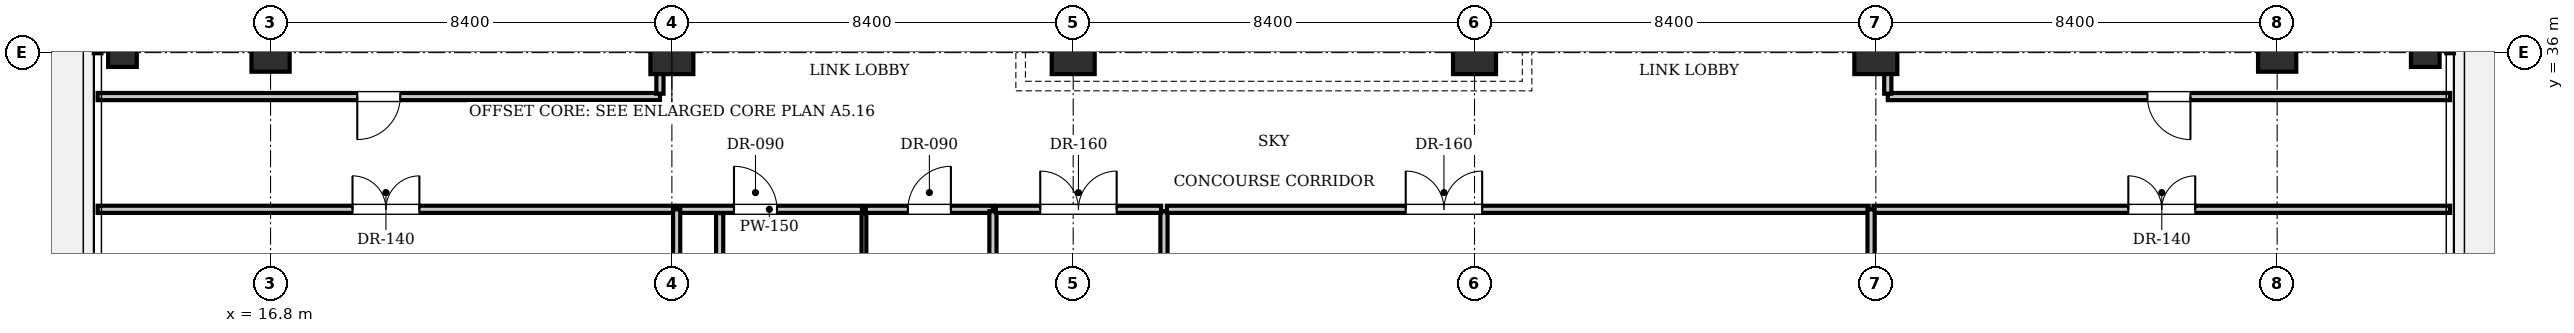
"""IFC4 building model, lengths in metres.
Left out: names, types, materials, properties, quantities, classifications, styles, units other than length and angle.
Written with IfcOpenShell. Run it as: python <this file> out.ifc"""

import sys

from ifc_helpers import new_model, si_unit, direction, frame, frame_2d, origin, origin_2d, place, context, subcontext, project, spatial, rectangle, i_section, extrude, element, fill, save


model = new_model("IFC4")
c1 = context("Model", 3, precision=1e-05, world=origin(), true_north=direction((0.0, 1.0)))
c2 = subcontext(c1, "Body", "Model", "MODEL_VIEW")
j1 = project(units=[si_unit("LENGTHUNIT", "METRE"), si_unit("PLANEANGLEUNIT", "RADIAN")], contexts=[c1])
p1 = place(None, origin())
s1 = spatial("IfcSite", under=j1, at=p1, CompositionType="ELEMENT")
p2 = place(p1, origin())
s2 = spatial("IfcBuilding", under=s1, at=p2, CompositionType="ELEMENT")
p3 = place(p2, frame((0.0, 0.0, 122.5)))
s3 = spatial("IfcBuildingStorey", under=s2, at=p3, CompositionType="ELEMENT", Elevation=122.5)
for number, where, z_axis, x_axis in (
    (1, (25.2, 36.0, 0.0), (0.0, 0.0, 1.0), (1.0, 0.0, 0.0)),
    (2, (33.6, 36.0, 0.0), (0.0, 0.0, 1.0), (1.0, 0.0, 0.0)),
    (3, (42.0, 36.0, 0.0), (0.0, 0.0, 1.0), (1.0, 0.0, 0.0)),
    (4, (50.4, 36.0, 0.0), (0.0, 0.0, 1.0), (1.0, 0.0, 0.0)),
):
    element("IfcColumn", number, at=place(p3, frame(where, z_axis=z_axis, x_axis=x_axis)), inside=s3, PredefinedType="COLUMN", context=c2, shape_type="SweptSolid", body=[
        extrude(rectangle(XDim=0.9, YDim=0.9, at=origin_2d()), origin(), (0.0, 0.0, 1.0), 4.9),
    ])
for number, where, z_axis, x_axis in (
    (5, (16.8, 36.0, 0.0), (0.0, 0.0, 1.0), (1.0, 0.0, 0.0)),
    (6, (58.8, 36.0, 0.0), (0.0, 0.0, 1.0), (1.0, 0.0, 0.0)),
):
    element("IfcColumn", number, at=place(p3, frame(where, z_axis=z_axis, x_axis=x_axis)), inside=s3, PredefinedType="COLUMN", context=c2, shape_type="SweptSolid", body=[
        extrude(rectangle(XDim=0.8, YDim=0.8, at=origin_2d()), origin(), (0.0, 0.0, 1.0), 4.9),
    ])
for number, where, z_axis, x_axis in (
    (7, (13.7, 36.0, -0.24), (0.0, 0.0, 1.0), (1.0, 0.0, 0.0)),
    (8, (61.9, 36.0, -0.24), (0.0, 0.0, 1.0), (1.0, 0.0, 0.0)),
):
    element("IfcColumn", number, at=place(p3, frame(where, z_axis=z_axis, x_axis=x_axis)), inside=s3, PredefinedType="COLUMN", context=c2, shape_type="SweptSolid", body=[
        extrude(i_section(OverallWidth=0.6, OverallDepth=0.6, WebThickness=0.025, FlangeThickness=0.038, at=origin_2d()), origin(), (0.0, 0.0, 1.0), 5.14),
    ])
p4 = place(p3, frame((25.3, 32.72, 0.0), z_axis=(0.0, 0.0, 1.0), x_axis=(1.0, 0.0, 0.0)))
e9 = element("IfcWall", 9, at=p4, inside=s3, PredefinedType="PARTITIONING", context=c2, shape_type="SweptSolid", body=[
    extrude(rectangle(XDim=3.88, YDim=0.15, at=frame_2d((1.94, 0.0))), origin(), (0.0, 0.0, 1.0), 4.66),
])
p5 = place(p4, frame((1.2, 0.0, 0.0)))
e10 = element("IfcOpeningElement", 10, at=p5, cuts=e9, PredefinedType="OPENING", context=c2, shape_type="SweptSolid", body=[
    extrude(rectangle(XDim=0.9, YDim=2.1, at=frame_2d((0.45, 1.05))), frame((0.0, 0.085, 0.0), z_axis=(0.0, -1.0, 0.0), x_axis=(1.0, 0.0, 0.0)), (0.0, 0.0, 1.0), 0.17),
])
p6 = place(p3, frame((29.26, 32.72, 0.0), z_axis=(0.0, 0.0, 1.0), x_axis=(1.0, 0.0, 0.0)))
e11 = element("IfcWall", 11, at=p6, inside=s3, PredefinedType="PARTITIONING", context=c2, shape_type="SweptSolid", body=[
    extrude(rectangle(XDim=2.66, YDim=0.15, at=frame_2d((1.33, 0.0))), origin(), (0.0, 0.0, 1.0), 4.66),
])
p7 = place(p6, frame((0.88, 0.0, 0.0)))
e12 = element("IfcOpeningElement", 12, at=p7, cuts=e11, PredefinedType="OPENING", context=c2, shape_type="SweptSolid", body=[
    extrude(rectangle(XDim=0.9, YDim=2.1, at=frame_2d((0.45, 1.05))), frame((0.0, 0.085, 0.0), z_axis=(0.0, -1.0, 0.0), x_axis=(1.0, 0.0, 0.0)), (0.0, 0.0, 1.0), 0.17),
])
p8 = place(p3, frame((26.2, 29.46, 0.0), z_axis=(0.0, 0.0, 1.0), x_axis=(0.0, 1.0, 0.0)))
e13 = element("IfcWall", 13, at=p8, inside=s3, PredefinedType="PARTITIONING", context=c2, shape_type="SweptSolid", body=[
    extrude(rectangle(XDim=3.18, YDim=0.15, at=frame_2d((1.59, 0.0))), origin(), (0.0, 0.0, 1.0), 4.66),
])
p9 = place(p3, frame((29.22, 29.46, 0.0), z_axis=(0.0, 0.0, 1.0), x_axis=(0.0, 1.0, 0.0)))
e14 = element("IfcWall", 14, at=p9, inside=s3, PredefinedType="PARTITIONING", context=c2, shape_type="SweptSolid", body=[
    extrude(rectangle(XDim=3.18, YDim=0.1, at=frame_2d((1.59, 0.0))), origin(), (0.0, 0.0, 1.0), 4.66),
])
p10 = place(p3, frame((31.92, 29.46, 0.0), z_axis=(0.0, 0.0, 1.0), x_axis=(0.0, 1.0, 0.0)))
e15 = element("IfcWall", 15, at=p10, inside=s3, PredefinedType="PARTITIONING", context=c2, shape_type="SweptSolid", body=[
    extrude(rectangle(XDim=3.22, YDim=0.15, at=frame_2d((1.61, 0.0))), origin(), (0.0, 0.0, 1.0), 4.66),
])
p11 = place(p3, frame((35.5, 21.08, 0.0), z_axis=(0.0, 0.0, 1.0), x_axis=(0.0, 1.0, 0.0)))
e16 = element("IfcWall", 16, at=p11, inside=s3, PredefinedType="PARTITIONING", context=c2, shape_type="SweptSolid", body=[
    extrude(rectangle(XDim=11.6, YDim=0.15, at=frame_2d((5.8, 0.0))), origin(), (0.0, 0.0, 1.0), 4.66),
])
p12 = place(p3, frame((31.98, 32.72, 0.0), z_axis=(0.0, 0.0, 1.0), x_axis=(1.0, 0.0, 0.0)))
e17 = element("IfcWall", 17, at=p12, inside=s3, PredefinedType="PARTITIONING", context=c2, shape_type="SweptSolid", body=[
    extrude(rectangle(XDim=3.46, YDim=0.15, at=frame_2d((1.73, 0.0))), origin(), (0.0, 0.0, 1.0), 4.66),
])
p13 = place(p12, frame((0.93, 0.0, 0.0)))
e18 = element("IfcOpeningElement", 18, at=p13, cuts=e17, PredefinedType="OPENING", context=c2, shape_type="SweptSolid", body=[
    extrude(rectangle(XDim=1.6, YDim=2.3, at=frame_2d((0.8, 1.15))), frame((0.0, 0.085, 0.0), z_axis=(0.0, -1.0, 0.0), x_axis=(1.0, 0.0, 0.0)), (0.0, 0.0, 1.0), 0.17),
])
p14 = place(p3, frame((35.56, 32.72, 0.0), z_axis=(0.0, 0.0, 1.0), x_axis=(1.0, 0.0, 0.0)))
e19 = element("IfcWall", 19, at=p14, inside=s3, PredefinedType="PARTITIONING", context=c2, shape_type="SweptSolid", body=[
    extrude(rectangle(XDim=14.69, YDim=0.15, at=frame_2d((7.345, 0.0))), origin(), (0.0, 0.0, 1.0), 4.66),
])
p15 = place(p14, frame((5.0, 0.0, 0.0)))
e20 = element("IfcOpeningElement", 20, at=p15, cuts=e19, PredefinedType="OPENING", context=c2, shape_type="SweptSolid", body=[
    extrude(rectangle(XDim=1.6, YDim=2.3, at=frame_2d((0.8, 1.15))), frame((0.0, 0.085, 0.0), z_axis=(0.0, -1.0, 0.0), x_axis=(1.0, 0.0, 0.0)), (0.0, 0.0, 1.0), 0.17),
])
p16 = place(p3, frame((13.18, 32.72, 0.0), z_axis=(0.0, 0.0, 1.0), x_axis=(1.0, 0.0, 0.0)))
e21 = element("IfcWall", 21, at=p16, inside=s3, PredefinedType="PARTITIONING", context=c2, shape_type="SweptSolid", body=[
    extrude(rectangle(XDim=12.07, YDim=0.15, at=frame_2d((6.035, 0.0))), origin(), (0.0, 0.0, 1.0), 4.66),
])
p17 = place(p16, frame((5.335, 0.0, 0.0)))
e22 = element("IfcOpeningElement", 22, at=p17, cuts=e21, PredefinedType="OPENING", context=c2, shape_type="SweptSolid", body=[
    extrude(rectangle(XDim=1.4, YDim=2.2, at=frame_2d((0.7, 1.1))), frame((0.0, 0.085, 0.0), z_axis=(0.0, -1.0, 0.0), x_axis=(1.0, 0.0, 0.0)), (0.0, 0.0, 1.0), 0.17),
])
p18 = place(p3, frame((50.35, 32.72, 0.0), z_axis=(0.0, 0.0, 1.0), x_axis=(1.0, 0.0, 0.0)))
e23 = element("IfcWall", 23, at=p18, inside=s3, PredefinedType="PARTITIONING", context=c2, shape_type="SweptSolid", body=[
    extrude(rectangle(XDim=12.07, YDim=0.15, at=frame_2d((6.035, 0.0))), origin(), (0.0, 0.0, 1.0), 4.66),
])
p19 = place(p18, frame((5.335, 0.0, 0.0)))
e24 = element("IfcOpeningElement", 24, at=p19, cuts=e23, PredefinedType="OPENING", context=c2, shape_type="SweptSolid", body=[
    extrude(rectangle(XDim=1.4, YDim=2.2, at=frame_2d((0.7, 1.1))), frame((0.0, 0.085, 0.0), z_axis=(0.0, -1.0, 0.0), x_axis=(1.0, 0.0, 0.0)), (0.0, 0.0, 1.0), 0.17),
])
for number, where, z_axis, x_axis in (
    (25, (25.3, 4.68, 0.0), (0.0, 0.0, 1.0), (0.0, 1.0, 0.0)),
    (26, (50.3, 4.68, 0.0), (0.0, 0.0, 1.0), (0.0, 1.0, 0.0)),
):
    element("IfcWall", number, at=place(p3, frame(where, z_axis=z_axis, x_axis=x_axis)), inside=s3, PredefinedType="PARTITIONING", context=c2, shape_type="SweptSolid", body=[
        extrude(rectangle(XDim=28.04, YDim=0.15, at=frame_2d((14.02, 0.0))), origin(), (0.0, 0.0, 1.0), 4.048),
    ])
p20 = place(p3, frame((13.18, 35.08, 0.0), z_axis=(0.0, 0.0, 1.0), x_axis=(1.0, 0.0, 0.0)))
e27 = element("IfcWall", 27, at=p20, inside=s3, PredefinedType="PARTITIONING", context=c2, shape_type="SweptSolid", body=[
    extrude(rectangle(XDim=11.77, YDim=0.15, at=frame_2d((5.885, 0.0))), origin(), (0.0, 0.0, 1.0), 4.66),
])
p21 = place(p20, frame((5.435, 0.0, 0.0)))
e28 = element("IfcOpeningElement", 28, at=p21, cuts=e27, PredefinedType="OPENING", context=c2, shape_type="SweptSolid", body=[
    extrude(rectangle(XDim=0.9, YDim=2.1, at=frame_2d((0.45, 1.05))), frame((0.0, 0.085, 0.0), z_axis=(0.0, -1.0, 0.0), x_axis=(1.0, 0.0, 0.0)), (0.0, 0.0, 1.0), 0.17),
])
p22 = place(p3, frame((24.95, 35.14, 0.0), z_axis=(0.0, 0.0, 1.0), x_axis=(0.0, 1.0, 0.0)))
e29 = element("IfcWall", 29, at=p22, inside=s3, PredefinedType="PARTITIONING", context=c2, shape_type="SweptSolid", body=[
    extrude(rectangle(XDim=18.78, YDim=0.15, at=frame_2d((9.39, 0.0))), origin(), (0.0, 0.0, 1.0), 4.66),
])
p23 = place(p3, frame((50.65, 35.08, 0.0), z_axis=(0.0, 0.0, 1.0), x_axis=(1.0, 0.0, 0.0)))
e30 = element("IfcWall", 30, at=p23, inside=s3, PredefinedType="PARTITIONING", context=c2, shape_type="SweptSolid", body=[
    extrude(rectangle(XDim=11.77, YDim=0.15, at=frame_2d((5.885, 0.0))), origin(), (0.0, 0.0, 1.0), 4.66),
])
p24 = place(p23, frame((5.435, 0.0, 0.0)))
e31 = element("IfcOpeningElement", 31, at=p24, cuts=e30, PredefinedType="OPENING", context=c2, shape_type="SweptSolid", body=[
    extrude(rectangle(XDim=0.9, YDim=2.1, at=frame_2d((0.45, 1.05))), frame((0.0, 0.085, 0.0), z_axis=(0.0, -1.0, 0.0), x_axis=(1.0, 0.0, 0.0)), (0.0, 0.0, 1.0), 0.17),
])
p25 = place(p3, frame((50.65, 35.14, 0.0), z_axis=(0.0, 0.0, 1.0), x_axis=(0.0, 1.0, 0.0)))
e32 = element("IfcWall", 32, at=p25, inside=s3, PredefinedType="PARTITIONING", context=c2, shape_type="SweptSolid", body=[
    extrude(rectangle(XDim=18.78, YDim=0.15, at=frame_2d((9.39, 0.0))), origin(), (0.0, 0.0, 1.0), 4.66),
])
p26 = place(p5, origin())
e33 = element("IfcDoor", 33, at=p26, inside=s3, OperationType="SINGLE_SWING_LEFT", PredefinedType="DOOR", context=c2, shape_type="SweptSolid", body=[
    extrude(rectangle(XDim=0.9, YDim=2.1, at=frame_2d((0.45, 1.05))), frame((0.0, 0.025, 0.0), z_axis=(0.0, -1.0, 0.0), x_axis=(1.0, 0.0, 0.0)), (0.0, 0.0, 1.0), 0.05),
])
fill(e10, e33)
p27 = place(p7, origin())
e34 = element("IfcDoor", 34, at=p27, inside=s3, OperationType="SINGLE_SWING_RIGHT", PredefinedType="DOOR", context=c2, shape_type="SweptSolid", body=[
    extrude(rectangle(XDim=0.9, YDim=2.1, at=frame_2d((0.45, 1.05))), frame((0.0, 0.025, 0.0), z_axis=(0.0, -1.0, 0.0), x_axis=(1.0, 0.0, 0.0)), (0.0, 0.0, 1.0), 0.05),
])
fill(e12, e34)
p28 = place(p13, origin())
e35 = element("IfcDoor", 35, at=p28, inside=s3, OperationType="DOUBLE_DOOR_SINGLE_SWING", PredefinedType="DOOR", context=c2, shape_type="SweptSolid", body=[
    extrude(rectangle(XDim=1.6, YDim=2.3, at=frame_2d((0.8, 1.15))), frame((0.0, 0.025, 0.0), z_axis=(0.0, -1.0, 0.0), x_axis=(1.0, 0.0, 0.0)), (0.0, 0.0, 1.0), 0.05),
])
fill(e18, e35)
p29 = place(p15, origin())
e36 = element("IfcDoor", 36, at=p29, inside=s3, OperationType="DOUBLE_DOOR_SINGLE_SWING", PredefinedType="DOOR", context=c2, shape_type="SweptSolid", body=[
    extrude(rectangle(XDim=1.6, YDim=2.3, at=frame_2d((0.8, 1.15))), frame((0.0, 0.025, 0.0), z_axis=(0.0, -1.0, 0.0), x_axis=(1.0, 0.0, 0.0)), (0.0, 0.0, 1.0), 0.05),
])
fill(e20, e36)
p30 = place(p17, origin())
e37 = element("IfcDoor", 37, at=p30, inside=s3, OperationType="DOUBLE_DOOR_SINGLE_SWING", PredefinedType="DOOR", context=c2, shape_type="SweptSolid", body=[
    extrude(rectangle(XDim=1.4, YDim=2.2, at=frame_2d((0.7, 1.1))), frame((0.0, 0.025, 0.0), z_axis=(0.0, -1.0, 0.0), x_axis=(1.0, 0.0, 0.0)), (0.0, 0.0, 1.0), 0.05),
])
fill(e22, e37)
p31 = place(p19, origin())
e38 = element("IfcDoor", 38, at=p31, inside=s3, OperationType="DOUBLE_DOOR_SINGLE_SWING", PredefinedType="DOOR", context=c2, shape_type="SweptSolid", body=[
    extrude(rectangle(XDim=1.4, YDim=2.2, at=frame_2d((0.7, 1.1))), frame((0.0, 0.025, 0.0), z_axis=(0.0, -1.0, 0.0), x_axis=(1.0, 0.0, 0.0)), (0.0, 0.0, 1.0), 0.05),
])
fill(e24, e38)
p32 = place(p21, frame((0.9, 0.0, 0.0), z_axis=(0.0, 0.0, 1.0), x_axis=(-1.0, 0.0, 0.0)))
e39 = element("IfcDoor", 39, at=p32, inside=s3, OperationType="SINGLE_SWING_RIGHT", PredefinedType="DOOR", context=c2, shape_type="SweptSolid", body=[
    extrude(rectangle(XDim=0.9, YDim=2.1, at=frame_2d((0.45, 1.05))), frame((0.0, 0.025, 0.0), z_axis=(0.0, -1.0, 0.0), x_axis=(1.0, 0.0, 0.0)), (0.0, 0.0, 1.0), 0.05),
])
fill(e28, e39)
p33 = place(p24, frame((0.9, 0.0, 0.0), z_axis=(0.0, 0.0, 1.0), x_axis=(-1.0, 0.0, 0.0)))
e40 = element("IfcDoor", 40, at=p33, inside=s3, OperationType="SINGLE_SWING_LEFT", PredefinedType="DOOR", context=c2, shape_type="SweptSolid", body=[
    extrude(rectangle(XDim=0.9, YDim=2.1, at=frame_2d((0.45, 1.05))), frame((0.0, 0.025, 0.0), z_axis=(0.0, -1.0, 0.0), x_axis=(1.0, 0.0, 0.0)), (0.0, 0.0, 1.0), 0.05),
])
fill(e31, e40)
save(model, sys.argv[1])
